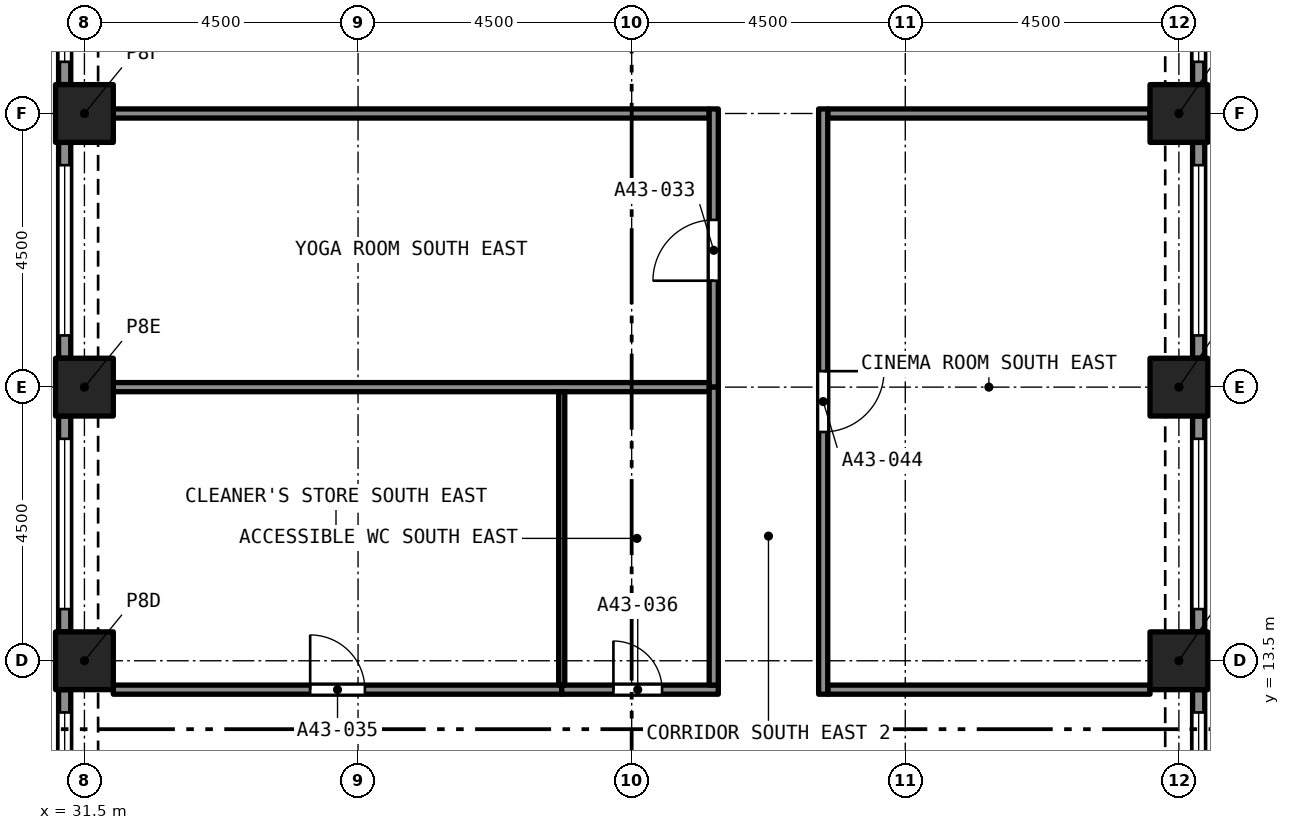
"""IFC4 building model, lengths in metres.
Left out: names, types, materials, properties, quantities, classifications, styles, units other than length and angle.
Written with IfcOpenShell. Run it as: python <this file> out.ifc"""

import sys

from ifc_helpers import new_model, si_unit, direction, frame, frame_2d, origin, origin_2d, place, context, subcontext, project, spatial, rectangle, extrude, element, fill, save


model = new_model("IFC4")
c1 = context("Model", 3, precision=1e-05, world=origin(), true_north=direction((0.0, 1.0)))
c2 = subcontext(c1, "Body", "Model", "MODEL_VIEW")
j1 = project(units=[si_unit("LENGTHUNIT", "METRE"), si_unit("PLANEANGLEUNIT", "RADIAN")], contexts=[c1])
p1 = place(None, origin())
s1 = spatial("IfcSite", under=j1, at=p1, CompositionType="ELEMENT")
p2 = place(p1, origin())
s2 = spatial("IfcBuilding", under=s1, at=p2, CompositionType="ELEMENT")
p3 = place(p2, frame((0.0, 0.0, 155.0)))
s3 = spatial("IfcBuildingStorey", under=s2, at=p3, CompositionType="ELEMENT", Elevation=155.0)
for number, where, z_axis, x_axis in (
    (1, (31.5, 13.5, 0.0), (0.0, 0.0, 1.0), (1.0, 0.0, 0.0)),
    (2, (49.5, 13.5, 0.0), (0.0, 0.0, 1.0), (1.0, 0.0, 0.0)),
    (3, (31.5, 18.0, 0.0), (0.0, 0.0, 1.0), (1.0, 0.0, 0.0)),
    (4, (49.5, 18.0, 0.0), (0.0, 0.0, 1.0), (1.0, 0.0, 0.0)),
    (5, (31.5, 22.5, 0.0), (0.0, 0.0, 1.0), (1.0, 0.0, 0.0)),
    (6, (49.5, 22.5, 0.0), (0.0, 0.0, 1.0), (1.0, 0.0, 0.0)),
):
    element("IfcColumn", number, at=place(p3, frame(where, z_axis=z_axis, x_axis=x_axis)), inside=s3, PredefinedType="COLUMN", context=c2, shape_type="SweptSolid", body=[
        extrude(rectangle(XDim=0.95, YDim=0.95, at=origin_2d()), origin(), (0.0, 0.0, 1.0), 4.4),
    ])
p4 = place(p3, frame((49.825, 13.025, 0.0), z_axis=(0.0, 0.0, 1.0), x_axis=(0.0, -1.0, 0.0)))
e7 = element("IfcWall", 7, at=p4, inside=s3, PredefinedType="SOLIDWALL", context=c2, shape_type="SweptSolid", body=[
    extrude(rectangle(XDim=3.55, YDim=0.2, at=frame_2d((1.775, 0.0))), origin(), (0.0, 0.0, 1.0), 4.4),
])
p5 = place(p4, frame((0.375, 0.0, 0.45)))
e8 = element("IfcOpeningElement", 8, at=p5, cuts=e7, PredefinedType="OPENING", context=c2, shape_type="SweptSolid", body=[
    extrude(rectangle(XDim=2.8, YDim=2.55, at=frame_2d((1.4, 1.275))), frame((0.0, 0.11, 0.0), z_axis=(0.0, -1.0, 0.0), x_axis=(1.0, 0.0, 0.0)), (0.0, 0.0, 1.0), 0.22),
])
p6 = place(p3, frame((49.825, 17.525, 0.0), z_axis=(0.0, 0.0, 1.0), x_axis=(0.0, -1.0, 0.0)))
e9 = element("IfcWall", 9, at=p6, inside=s3, PredefinedType="SOLIDWALL", context=c2, shape_type="SweptSolid", body=[
    extrude(rectangle(XDim=3.55, YDim=0.2, at=frame_2d((1.775, 0.0))), origin(), (0.0, 0.0, 1.0), 4.4),
])
p7 = place(p6, frame((0.375, 0.0, 0.45)))
e10 = element("IfcOpeningElement", 10, at=p7, cuts=e9, PredefinedType="OPENING", context=c2, shape_type="SweptSolid", body=[
    extrude(rectangle(XDim=2.8, YDim=2.55, at=frame_2d((1.4, 1.275))), frame((0.0, 0.11, 0.0), z_axis=(0.0, -1.0, 0.0), x_axis=(1.0, 0.0, 0.0)), (0.0, 0.0, 1.0), 0.22),
])
p8 = place(p3, frame((49.825, 22.025, 0.0), z_axis=(0.0, 0.0, 1.0), x_axis=(0.0, -1.0, 0.0)))
e11 = element("IfcWall", 11, at=p8, inside=s3, PredefinedType="SOLIDWALL", context=c2, shape_type="SweptSolid", body=[
    extrude(rectangle(XDim=3.55, YDim=0.2, at=frame_2d((1.775, 0.0))), origin(), (0.0, 0.0, 1.0), 4.4),
])
p9 = place(p8, frame((0.375, 0.0, 0.45)))
e12 = element("IfcOpeningElement", 12, at=p9, cuts=e11, PredefinedType="OPENING", context=c2, shape_type="SweptSolid", body=[
    extrude(rectangle(XDim=2.8, YDim=2.55, at=frame_2d((1.4, 1.275))), frame((0.0, 0.11, 0.0), z_axis=(0.0, -1.0, 0.0), x_axis=(1.0, 0.0, 0.0)), (0.0, 0.0, 1.0), 0.22),
])
p10 = place(p3, frame((49.825, 26.525, 0.0), z_axis=(0.0, 0.0, 1.0), x_axis=(0.0, -1.0, 0.0)))
e13 = element("IfcWall", 13, at=p10, inside=s3, PredefinedType="SOLIDWALL", context=c2, shape_type="SweptSolid", body=[
    extrude(rectangle(XDim=3.55, YDim=0.2, at=frame_2d((1.775, 0.0))), origin(), (0.0, 0.0, 1.0), 4.4),
])
p11 = place(p10, frame((0.375, 0.0, 0.45)))
e14 = element("IfcOpeningElement", 14, at=p11, cuts=e13, PredefinedType="OPENING", context=c2, shape_type="SweptSolid", body=[
    extrude(rectangle(XDim=2.8, YDim=2.55, at=frame_2d((1.4, 1.275))), frame((0.0, 0.11, 0.0), z_axis=(0.0, -1.0, 0.0), x_axis=(1.0, 0.0, 0.0)), (0.0, 0.0, 1.0), 0.22),
])
p12 = place(p3, frame((31.175, 22.975, 0.0), z_axis=(0.0, 0.0, 1.0), x_axis=(0.0, 1.0, 0.0)))
e15 = element("IfcWall", 15, at=p12, inside=s3, PredefinedType="SOLIDWALL", context=c2, shape_type="SweptSolid", body=[
    extrude(rectangle(XDim=3.55, YDim=0.2, at=frame_2d((1.775, 0.0))), origin(), (0.0, 0.0, 1.0), 4.4),
])
p13 = place(p12, frame((0.375, 0.0, 0.45)))
e16 = element("IfcOpeningElement", 16, at=p13, cuts=e15, PredefinedType="OPENING", context=c2, shape_type="SweptSolid", body=[
    extrude(rectangle(XDim=2.8, YDim=2.55, at=frame_2d((1.4, 1.275))), frame((0.0, 0.11, 0.0), z_axis=(0.0, -1.0, 0.0), x_axis=(1.0, 0.0, 0.0)), (0.0, 0.0, 1.0), 0.22),
])
p14 = place(p3, frame((31.175, 18.475, 0.0), z_axis=(0.0, 0.0, 1.0), x_axis=(0.0, 1.0, 0.0)))
e17 = element("IfcWall", 17, at=p14, inside=s3, PredefinedType="SOLIDWALL", context=c2, shape_type="SweptSolid", body=[
    extrude(rectangle(XDim=3.55, YDim=0.2, at=frame_2d((1.775, 0.0))), origin(), (0.0, 0.0, 1.0), 4.4),
])
p15 = place(p14, frame((0.375, 0.0, 0.45)))
e18 = element("IfcOpeningElement", 18, at=p15, cuts=e17, PredefinedType="OPENING", context=c2, shape_type="SweptSolid", body=[
    extrude(rectangle(XDim=2.8, YDim=2.55, at=frame_2d((1.4, 1.275))), frame((0.0, 0.11, 0.0), z_axis=(0.0, -1.0, 0.0), x_axis=(1.0, 0.0, 0.0)), (0.0, 0.0, 1.0), 0.22),
])
p16 = place(p3, frame((31.175, 13.975, 0.0), z_axis=(0.0, 0.0, 1.0), x_axis=(0.0, 1.0, 0.0)))
e19 = element("IfcWall", 19, at=p16, inside=s3, PredefinedType="SOLIDWALL", context=c2, shape_type="SweptSolid", body=[
    extrude(rectangle(XDim=3.55, YDim=0.2, at=frame_2d((1.775, 0.0))), origin(), (0.0, 0.0, 1.0), 4.4),
])
p17 = place(p16, frame((0.375, 0.0, 0.45)))
e20 = element("IfcOpeningElement", 20, at=p17, cuts=e19, PredefinedType="OPENING", context=c2, shape_type="SweptSolid", body=[
    extrude(rectangle(XDim=2.8, YDim=2.55, at=frame_2d((1.4, 1.275))), frame((0.0, 0.11, 0.0), z_axis=(0.0, -1.0, 0.0), x_axis=(1.0, 0.0, 0.0)), (0.0, 0.0, 1.0), 0.22),
])
p18 = place(p3, frame((31.175, 9.475, 0.0), z_axis=(0.0, 0.0, 1.0), x_axis=(0.0, 1.0, 0.0)))
e21 = element("IfcWall", 21, at=p18, inside=s3, PredefinedType="SOLIDWALL", context=c2, shape_type="SweptSolid", body=[
    extrude(rectangle(XDim=3.55, YDim=0.2, at=frame_2d((1.775, 0.0))), origin(), (0.0, 0.0, 1.0), 4.4),
])
p19 = place(p18, frame((0.375, 0.0, 0.45)))
e22 = element("IfcOpeningElement", 22, at=p19, cuts=e21, PredefinedType="OPENING", context=c2, shape_type="SweptSolid", body=[
    extrude(rectangle(XDim=2.8, YDim=2.55, at=frame_2d((1.4, 1.275))), frame((0.0, 0.11, 0.0), z_axis=(0.0, -1.0, 0.0), x_axis=(1.0, 0.0, 0.0)), (0.0, 0.0, 1.0), 0.22),
])
p20 = place(p3, frame((31.975, 22.5, 0.0), z_axis=(0.0, 0.0, 1.0), x_axis=(1.0, 0.0, 0.0)))
e23 = element("IfcWall", 23, at=p20, inside=s3, PredefinedType="PARTITIONING", context=c2, shape_type="SweptSolid", body=[
    extrude(rectangle(XDim=9.8, YDim=0.15, at=frame_2d((4.9, 0.0))), origin(), (0.0, 0.0, 1.0), 4.1),
])
p21 = place(p3, frame((41.85, 18.0, 0.0), z_axis=(0.0, 0.0, 1.0), x_axis=(0.0, 1.0, 0.0)))
e24 = element("IfcWall", 24, at=p21, inside=s3, PredefinedType="PARTITIONING", context=c2, shape_type="SweptSolid", body=[
    extrude(rectangle(XDim=4.575, YDim=0.15, at=frame_2d((2.288, 0.0))), origin(), (0.0, 0.0, 1.0), 4.1),
])
p22 = place(p21, frame((1.75, 0.0, 0.0)))
e25 = element("IfcOpeningElement", 25, at=p22, cuts=e24, PredefinedType="OPENING", context=c2, shape_type="SweptSolid", body=[
    extrude(rectangle(XDim=1.0, YDim=2.1, at=frame_2d((0.5, 1.05))), frame((0.0, 0.085, 0.0), z_axis=(0.0, -1.0, 0.0), x_axis=(1.0, 0.0, 0.0)), (0.0, 0.0, 1.0), 0.17),
])
p23 = place(p3, frame((31.975, 18.0, 0.0), z_axis=(0.0, 0.0, 1.0), x_axis=(1.0, 0.0, 0.0)))
e26 = element("IfcWall", 26, at=p23, inside=s3, PredefinedType="PARTITIONING", context=c2, shape_type="SweptSolid", body=[
    extrude(rectangle(XDim=9.8, YDim=0.15, at=frame_2d((4.9, 0.0))), origin(), (0.0, 0.0, 1.0), 4.1),
])
p24 = place(p3, frame((31.975, 13.025, 0.0), z_axis=(0.0, 0.0, 1.0), x_axis=(1.0, 0.0, 0.0)))
e27 = element("IfcWall", 27, at=p24, inside=s3, PredefinedType="PARTITIONING", context=c2, shape_type="SweptSolid", body=[
    extrude(rectangle(XDim=7.375, YDim=0.15, at=frame_2d((3.688, 0.0))), origin(), (0.0, 0.0, 1.0), 4.1),
])
p25 = place(p24, frame((3.238, 0.0, 0.0)))
e28 = element("IfcOpeningElement", 28, at=p25, cuts=e27, PredefinedType="OPENING", context=c2, shape_type="SweptSolid", body=[
    extrude(rectangle(XDim=0.9, YDim=2.1, at=frame_2d((0.45, 1.05))), frame((0.0, 0.085, 0.0), z_axis=(0.0, -1.0, 0.0), x_axis=(1.0, 0.0, 0.0)), (0.0, 0.0, 1.0), 0.17),
])
p26 = place(p3, frame((39.35, 13.025, 0.0), z_axis=(0.0, 0.0, 1.0), x_axis=(1.0, 0.0, 0.0)))
e29 = element("IfcWall", 29, at=p26, inside=s3, PredefinedType="PARTITIONING", context=c2, shape_type="SweptSolid", body=[
    extrude(rectangle(XDim=2.575, YDim=0.15, at=frame_2d((1.288, 0.0))), origin(), (0.0, 0.0, 1.0), 4.1),
])
p27 = place(p26, frame((0.85, 0.0, 0.0)))
e30 = element("IfcOpeningElement", 30, at=p27, cuts=e29, PredefinedType="OPENING", context=c2, shape_type="SweptSolid", body=[
    extrude(rectangle(XDim=0.8, YDim=2.1, at=frame_2d((0.4, 1.05))), frame((0.0, 0.085, 0.0), z_axis=(0.0, -1.0, 0.0), x_axis=(1.0, 0.0, 0.0)), (0.0, 0.0, 1.0), 0.17),
])
for number, where, z_axis, x_axis in (
    (31, (43.725, 13.025, 0.0), (0.0, 0.0, 1.0), (1.0, 0.0, 0.0)),
    (32, (43.725, 22.5, 0.0), (0.0, 0.0, 1.0), (1.0, 0.0, 0.0)),
):
    element("IfcWall", number, at=place(p3, frame(where, z_axis=z_axis, x_axis=x_axis)), inside=s3, PredefinedType="PARTITIONING", context=c2, shape_type="SweptSolid", body=[
        extrude(rectangle(XDim=5.3, YDim=0.15, at=frame_2d((2.65, 0.0))), origin(), (0.0, 0.0, 1.0), 4.1),
    ])
p28 = place(p3, frame((41.85, 13.1, 0.0), z_axis=(0.0, 0.0, 1.0), x_axis=(0.0, 1.0, 0.0)))
e33 = element("IfcWall", 33, at=p28, inside=s3, PredefinedType="PARTITIONING", context=c2, shape_type="SweptSolid", body=[
    extrude(rectangle(XDim=4.9, YDim=0.15, at=frame_2d((2.45, 0.0))), origin(), (0.0, 0.0, 1.0), 4.1),
])
p29 = place(p3, frame((43.65, 22.575, 0.0), z_axis=(0.0, 0.0, 1.0), x_axis=(0.0, -1.0, 0.0)))
e34 = element("IfcWall", 34, at=p29, inside=s3, PredefinedType="PARTITIONING", context=c2, shape_type="SweptSolid", body=[
    extrude(rectangle(XDim=9.625, YDim=0.15, at=frame_2d((4.812, 0.0))), origin(), (0.0, 0.0, 1.0), 4.1),
])
p30 = place(p29, frame((4.312, 0.0, 0.0)))
e35 = element("IfcOpeningElement", 35, at=p30, cuts=e34, PredefinedType="OPENING", context=c2, shape_type="SweptSolid", body=[
    extrude(rectangle(XDim=1.0, YDim=2.1, at=frame_2d((0.5, 1.05))), frame((0.0, 0.085, 0.0), z_axis=(0.0, -1.0, 0.0), x_axis=(1.0, 0.0, 0.0)), (0.0, 0.0, 1.0), 0.17),
])
p31 = place(p3, frame((39.35, 13.1, 0.0), z_axis=(0.0, 0.0, 1.0), x_axis=(0.0, 1.0, 0.0)))
e36 = element("IfcWall", 36, at=p31, inside=s3, PredefinedType="PARTITIONING", context=c2, shape_type="SweptSolid", body=[
    extrude(rectangle(XDim=4.825, YDim=0.1, at=frame_2d((2.413, 0.0))), origin(), (0.0, 0.0, 1.0), 4.1),
])
p32 = place(p5, origin())
e37 = element("IfcWindow", 37, at=p32, inside=s3, PartitioningType="SINGLE_PANEL", PredefinedType="WINDOW", context=c2, shape_type="SweptSolid", body=[
    extrude(rectangle(XDim=2.8, YDim=2.55, at=frame_2d((1.4, 1.275))), frame((0.0, 0.03, 0.0), z_axis=(0.0, -1.0, 0.0), x_axis=(1.0, 0.0, 0.0)), (0.0, 0.0, 1.0), 0.06),
])
fill(e8, e37)
p33 = place(p7, origin())
e38 = element("IfcWindow", 38, at=p33, inside=s3, PartitioningType="SINGLE_PANEL", PredefinedType="WINDOW", context=c2, shape_type="SweptSolid", body=[
    extrude(rectangle(XDim=2.8, YDim=2.55, at=frame_2d((1.4, 1.275))), frame((0.0, 0.03, 0.0), z_axis=(0.0, -1.0, 0.0), x_axis=(1.0, 0.0, 0.0)), (0.0, 0.0, 1.0), 0.06),
])
fill(e10, e38)
p34 = place(p9, origin())
e39 = element("IfcWindow", 39, at=p34, inside=s3, PartitioningType="SINGLE_PANEL", PredefinedType="WINDOW", context=c2, shape_type="SweptSolid", body=[
    extrude(rectangle(XDim=2.8, YDim=2.55, at=frame_2d((1.4, 1.275))), frame((0.0, 0.03, 0.0), z_axis=(0.0, -1.0, 0.0), x_axis=(1.0, 0.0, 0.0)), (0.0, 0.0, 1.0), 0.06),
])
fill(e12, e39)
p35 = place(p11, origin())
e40 = element("IfcWindow", 40, at=p35, inside=s3, PartitioningType="SINGLE_PANEL", PredefinedType="WINDOW", context=c2, shape_type="SweptSolid", body=[
    extrude(rectangle(XDim=2.8, YDim=2.55, at=frame_2d((1.4, 1.275))), frame((0.0, 0.03, 0.0), z_axis=(0.0, -1.0, 0.0), x_axis=(1.0, 0.0, 0.0)), (0.0, 0.0, 1.0), 0.06),
])
fill(e14, e40)
p36 = place(p13, origin())
e41 = element("IfcWindow", 41, at=p36, inside=s3, PartitioningType="SINGLE_PANEL", PredefinedType="WINDOW", context=c2, shape_type="SweptSolid", body=[
    extrude(rectangle(XDim=2.8, YDim=2.55, at=frame_2d((1.4, 1.275))), frame((0.0, 0.03, 0.0), z_axis=(0.0, -1.0, 0.0), x_axis=(1.0, 0.0, 0.0)), (0.0, 0.0, 1.0), 0.06),
])
fill(e16, e41)
p37 = place(p15, origin())
e42 = element("IfcWindow", 42, at=p37, inside=s3, PartitioningType="SINGLE_PANEL", PredefinedType="WINDOW", context=c2, shape_type="SweptSolid", body=[
    extrude(rectangle(XDim=2.8, YDim=2.55, at=frame_2d((1.4, 1.275))), frame((0.0, 0.03, 0.0), z_axis=(0.0, -1.0, 0.0), x_axis=(1.0, 0.0, 0.0)), (0.0, 0.0, 1.0), 0.06),
])
fill(e18, e42)
p38 = place(p17, origin())
e43 = element("IfcWindow", 43, at=p38, inside=s3, PartitioningType="SINGLE_PANEL", PredefinedType="WINDOW", context=c2, shape_type="SweptSolid", body=[
    extrude(rectangle(XDim=2.8, YDim=2.55, at=frame_2d((1.4, 1.275))), frame((0.0, 0.03, 0.0), z_axis=(0.0, -1.0, 0.0), x_axis=(1.0, 0.0, 0.0)), (0.0, 0.0, 1.0), 0.06),
])
fill(e20, e43)
p39 = place(p19, origin())
e44 = element("IfcWindow", 44, at=p39, inside=s3, PartitioningType="SINGLE_PANEL", PredefinedType="WINDOW", context=c2, shape_type="SweptSolid", body=[
    extrude(rectangle(XDim=2.8, YDim=2.55, at=frame_2d((1.4, 1.275))), frame((0.0, 0.03, 0.0), z_axis=(0.0, -1.0, 0.0), x_axis=(1.0, 0.0, 0.0)), (0.0, 0.0, 1.0), 0.06),
])
fill(e22, e44)
p40 = place(p22, origin())
e45 = element("IfcDoor", 45, at=p40, inside=s3, OperationType="SINGLE_SWING_LEFT", PredefinedType="DOOR", context=c2, shape_type="SweptSolid", body=[
    extrude(rectangle(XDim=1.0, YDim=2.1, at=frame_2d((0.5, 1.05))), frame((0.0, 0.025, 0.0), z_axis=(0.0, -1.0, 0.0), x_axis=(1.0, 0.0, 0.0)), (0.0, 0.0, 1.0), 0.05),
])
fill(e25, e45)
p41 = place(p25, origin())
e46 = element("IfcDoor", 46, at=p41, inside=s3, OperationType="SINGLE_SWING_LEFT", PredefinedType="DOOR", context=c2, shape_type="SweptSolid", body=[
    extrude(rectangle(XDim=0.9, YDim=2.1, at=frame_2d((0.45, 1.05))), frame((0.0, 0.025, 0.0), z_axis=(0.0, -1.0, 0.0), x_axis=(1.0, 0.0, 0.0)), (0.0, 0.0, 1.0), 0.05),
])
fill(e28, e46)
p42 = place(p27, origin())
e47 = element("IfcDoor", 47, at=p42, inside=s3, OperationType="SINGLE_SWING_LEFT", PredefinedType="DOOR", context=c2, shape_type="SweptSolid", body=[
    extrude(rectangle(XDim=0.8, YDim=2.1, at=frame_2d((0.4, 1.05))), frame((0.0, 0.025, 0.0), z_axis=(0.0, -1.0, 0.0), x_axis=(1.0, 0.0, 0.0)), (0.0, 0.0, 1.0), 0.05),
])
fill(e30, e47)
p43 = place(p30, origin())
e48 = element("IfcDoor", 48, at=p43, inside=s3, OperationType="SINGLE_SWING_RIGHT", PredefinedType="DOOR", context=c2, shape_type="SweptSolid", body=[
    extrude(rectangle(XDim=1.0, YDim=2.1, at=frame_2d((0.5, 1.05))), frame((0.0, 0.025, 0.0), z_axis=(0.0, -1.0, 0.0), x_axis=(1.0, 0.0, 0.0)), (0.0, 0.0, 1.0), 0.05),
])
fill(e35, e48)
save(model, sys.argv[1])
